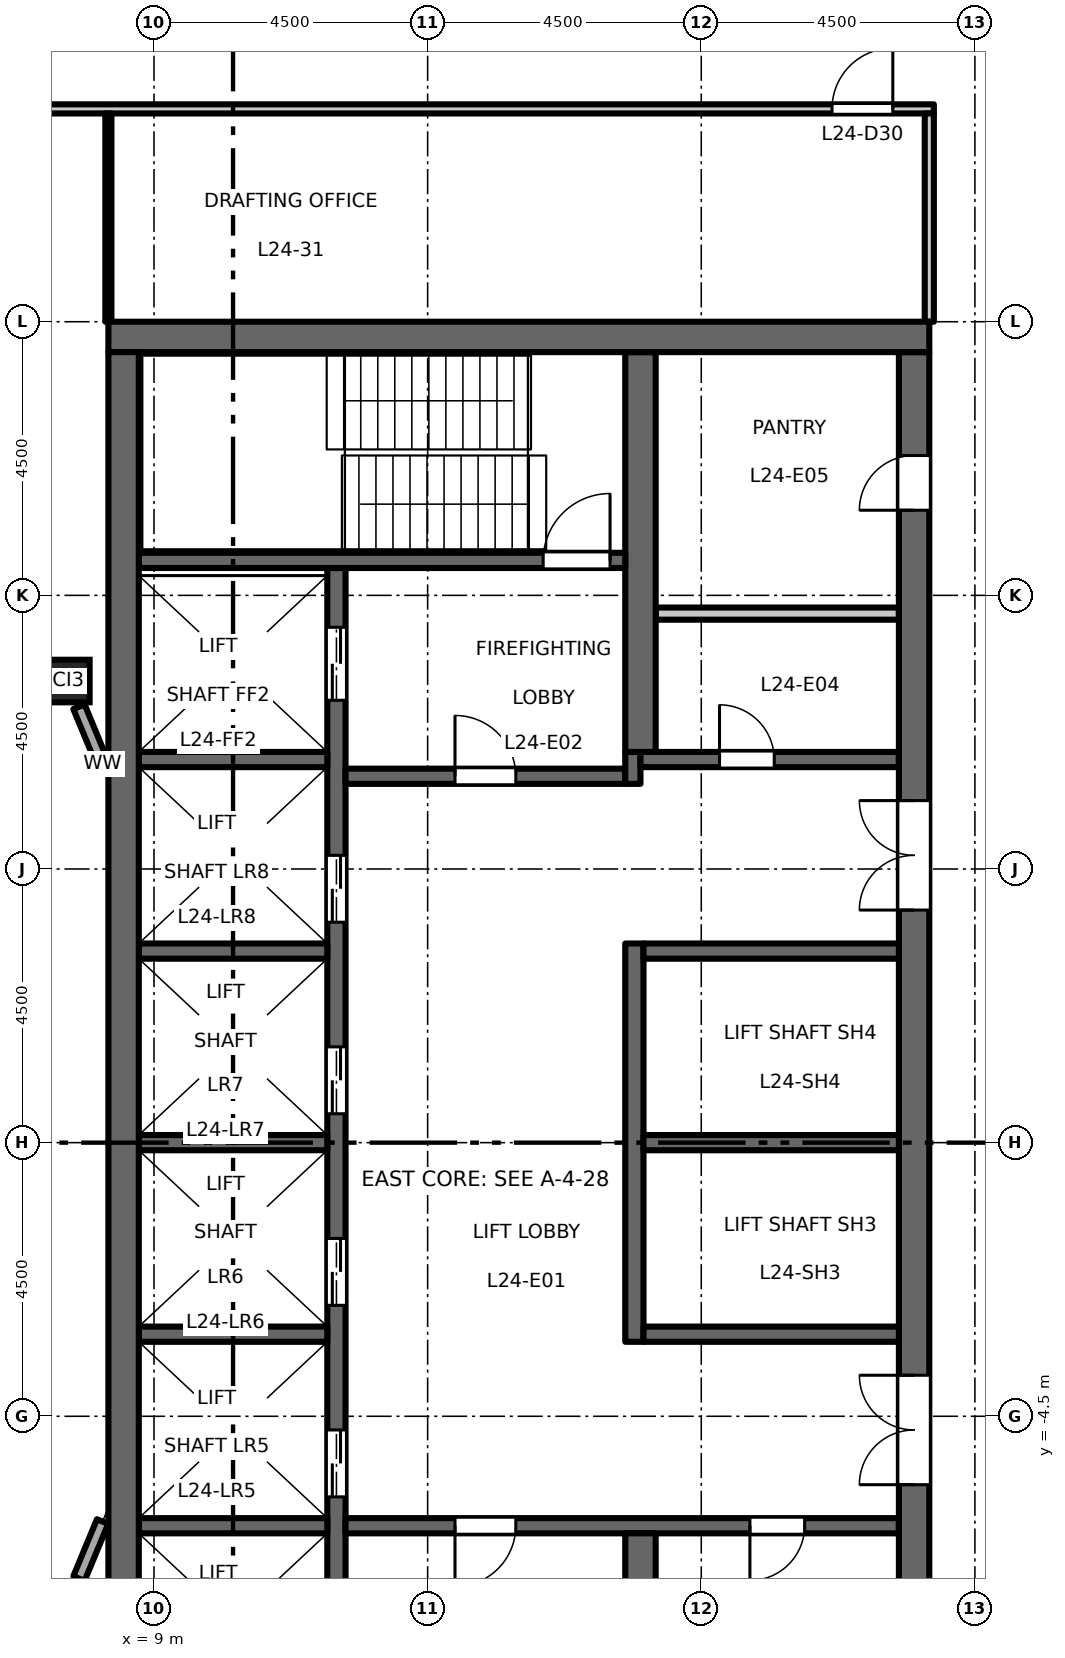
"""IFC4 building model, lengths in metres.
Left out: names, types, materials, properties, quantities, classifications, styles, units other than length and angle.
Written with IfcOpenShell. Run it as: python <this file> out.ifc"""

import sys

from ifc_helpers import new_model, si_unit, direction, frame, frame_2d, origin, origin_2d, place, context, subcontext, project, spatial, rectangle, hollow_rectangle, extrude, element, fill, save


model = new_model("IFC4")
c1 = context("Model", 3, precision=1e-05, world=origin(), true_north=direction((0.0, 1.0)))
c2 = subcontext(c1, "Body", "Model", "MODEL_VIEW")
j1 = project(units=[si_unit("LENGTHUNIT", "METRE"), si_unit("PLANEANGLEUNIT", "RADIAN")], contexts=[c1])
p1 = place(None, origin())
s1 = spatial("IfcSite", under=j1, at=p1, CompositionType="ELEMENT")
p2 = place(p1, origin())
s2 = spatial("IfcBuilding", under=s1, at=p2, CompositionType="ELEMENT")
p3 = place(p2, frame((0.0, 0.0, 113.7)))
s3 = spatial("IfcBuildingStorey", under=s2, at=p3, CompositionType="ELEMENT", Elevation=113.7)
p4 = place(p3, frame((7.591, 7.591, 0.0), z_axis=(0.0, 0.0, 1.0), x_axis=(1.0, 0.0, 0.0)))
e1 = element("IfcColumn", 1, at=p4, inside=s3, PredefinedType="COLUMN", context=c2, shape_type="SweptSolid", body=[
    extrude(hollow_rectangle(XDim=0.7, YDim=0.7, WallThickness=0.04, at=origin_2d()), origin(), (0.0, 0.0, 1.0), 4.5),
])
p5 = place(p3, frame((12.0, -9.45, 0.0), z_axis=(0.0, 0.0, 1.0), x_axis=(0.0, 1.0, 0.0)))
e2 = element("IfcWall", 2, at=p5, inside=s3, PredefinedType="SHEAR", context=c2, shape_type="SweptSolid", body=[
    extrude(rectangle(XDim=18.9, YDim=0.3, at=frame_2d((9.45, 0.0))), origin(), (0.0, 0.0, 1.0), 4.35),
])
p6 = place(p5, frame((3.625, 0.0, 0.0)))
e3 = element("IfcOpeningElement", 3, at=p6, cuts=e2, PredefinedType="OPENING", context=c2, shape_type="SweptSolid", body=[
    extrude(rectangle(XDim=1.1, YDim=2.1, at=frame_2d((0.55, 1.05))), frame((0.0, 0.16, 0.0), z_axis=(0.0, -1.0, 0.0), x_axis=(1.0, 0.0, 0.0)), (0.0, 0.0, 1.0), 0.32),
])
p7 = place(p5, frame((6.775, 0.0, 0.0)))
e4 = element("IfcOpeningElement", 4, at=p7, cuts=e2, PredefinedType="OPENING", context=c2, shape_type="SweptSolid", body=[
    extrude(rectangle(XDim=1.1, YDim=2.1, at=frame_2d((0.55, 1.05))), frame((0.0, 0.16, 0.0), z_axis=(0.0, -1.0, 0.0), x_axis=(1.0, 0.0, 0.0)), (0.0, 0.0, 1.0), 0.32),
])
p8 = place(p5, frame((9.925, 0.0, 0.0)))
e5 = element("IfcOpeningElement", 5, at=p8, cuts=e2, PredefinedType="OPENING", context=c2, shape_type="SweptSolid", body=[
    extrude(rectangle(XDim=1.1, YDim=2.1, at=frame_2d((0.55, 1.05))), frame((0.0, 0.16, 0.0), z_axis=(0.0, -1.0, 0.0), x_axis=(1.0, 0.0, 0.0)), (0.0, 0.0, 1.0), 0.32),
])
p9 = place(p5, frame((13.075, 0.0, 0.0)))
e6 = element("IfcOpeningElement", 6, at=p9, cuts=e2, PredefinedType="OPENING", context=c2, shape_type="SweptSolid", body=[
    extrude(rectangle(XDim=1.1, YDim=2.1, at=frame_2d((0.55, 1.05))), frame((0.0, 0.16, 0.0), z_axis=(0.0, -1.0, 0.0), x_axis=(1.0, 0.0, 0.0)), (0.0, 0.0, 1.0), 0.32),
])
p10 = place(p5, frame((16.725, 0.0, 0.0)))
e7 = element("IfcOpeningElement", 7, at=p10, cuts=e2, PredefinedType="OPENING", context=c2, shape_type="SweptSolid", body=[
    extrude(rectangle(XDim=1.2, YDim=2.1, at=frame_2d((0.6, 1.05))), frame((0.0, 0.16, 0.0), z_axis=(0.0, -1.0, 0.0), x_axis=(1.0, 0.0, 0.0)), (0.0, 0.0, 1.0), 0.32),
])
p11 = place(p5, frame((0.975, 0.0, 0.0)))
e8 = element("IfcOpeningElement", 8, at=p11, cuts=e2, PredefinedType="OPENING", context=c2, shape_type="SweptSolid", body=[
    extrude(rectangle(XDim=1.2, YDim=2.1, at=frame_2d((0.6, 1.05))), frame((0.0, 0.16, 0.0), z_axis=(0.0, -1.0, 0.0), x_axis=(1.0, 0.0, 0.0)), (0.0, 0.0, 1.0), 0.32),
])
p12 = place(p3, frame((12.15, 6.025, 0.0), z_axis=(0.0, 0.0, 1.0), x_axis=(1.0, 0.0, 0.0)))
e9 = element("IfcWall", 9, at=p12, inside=s3, PredefinedType="SHEAR", context=c2, shape_type="SweptSolid", body=[
    extrude(rectangle(XDim=4.6, YDim=0.25, at=frame_2d((2.3, 0.0))), origin(), (0.0, 0.0, 1.0), 4.35),
])
p13 = place(p12, frame((1.8, 0.0, 0.0)))
e10 = element("IfcOpeningElement", 10, at=p13, cuts=e9, PredefinedType="OPENING", context=c2, shape_type="SweptSolid", body=[
    extrude(rectangle(XDim=1.0, YDim=2.1, at=frame_2d((0.5, 1.05))), frame((0.0, 0.135, 0.0), z_axis=(0.0, -1.0, 0.0), x_axis=(1.0, 0.0, 0.0)), (0.0, 0.0, 1.0), 0.27),
])
p14 = place(p3, frame((16.875, 5.9, 0.0), z_axis=(0.0, 0.0, 1.0), x_axis=(0.0, 1.0, 0.0)))
e11 = element("IfcWall", 11, at=p14, inside=s3, PredefinedType="SHEAR", context=c2, shape_type="SweptSolid", body=[
    extrude(rectangle(XDim=0.525, YDim=0.25, at=frame_2d((0.263, 0.0))), origin(), (0.0, 0.0, 1.0), 4.35),
])
p15 = place(p3, frame((17.0, 6.3, 0.0), z_axis=(0.0, 0.0, 1.0), x_axis=(1.0, 0.0, 0.0)))
e12 = element("IfcWall", 12, at=p15, inside=s3, PredefinedType="SHEAR", context=c2, shape_type="SweptSolid", body=[
    extrude(rectangle(XDim=4.25, YDim=0.25, at=frame_2d((2.125, 0.0))), origin(), (0.0, 0.0, 1.0), 4.35),
])
p16 = place(p15, frame((1.3, 0.0, 0.0)))
e13 = element("IfcOpeningElement", 13, at=p16, cuts=e12, PredefinedType="OPENING", context=c2, shape_type="SweptSolid", body=[
    extrude(rectangle(XDim=0.9, YDim=2.1, at=frame_2d((0.45, 1.05))), frame((0.0, 0.135, 0.0), z_axis=(0.0, -1.0, 0.0), x_axis=(1.0, 0.0, 0.0)), (0.0, 0.0, 1.0), 0.27),
])
p17 = place(p3, frame((12.15, -6.3, 0.0), z_axis=(0.0, 0.0, 1.0), x_axis=(1.0, 0.0, 0.0)))
e14 = element("IfcWall", 14, at=p17, inside=s3, PredefinedType="SHEAR", context=c2, shape_type="SweptSolid", body=[
    extrude(rectangle(XDim=9.1, YDim=0.25, at=frame_2d((4.55, 0.0))), origin(), (0.0, 0.0, 1.0), 4.35),
])
p18 = place(p17, frame((1.8, 0.0, 0.0)))
e15 = element("IfcOpeningElement", 15, at=p18, cuts=e14, PredefinedType="OPENING", context=c2, shape_type="SweptSolid", body=[
    extrude(rectangle(XDim=1.0, YDim=2.1, at=frame_2d((0.5, 1.05))), frame((0.0, 0.135, 0.0), z_axis=(0.0, -1.0, 0.0), x_axis=(1.0, 0.0, 0.0)), (0.0, 0.0, 1.0), 0.27),
])
p19 = place(p17, frame((6.65, 0.0, 0.0)))
e16 = element("IfcOpeningElement", 16, at=p19, cuts=e14, PredefinedType="OPENING", context=c2, shape_type="SweptSolid", body=[
    extrude(rectangle(XDim=0.9, YDim=2.1, at=frame_2d((0.45, 1.05))), frame((0.0, 0.135, 0.0), z_axis=(0.0, -1.0, 0.0), x_axis=(1.0, 0.0, 0.0)), (0.0, 0.0, 1.0), 0.27),
])
p20 = place(p3, frame((21.5, -13.0, 0.0), z_axis=(0.0, 0.0, 1.0), x_axis=(0.0, 1.0, 0.0)))
e17 = element("IfcWall", 17, at=p20, inside=s3, PredefinedType="SHEAR", context=c2, shape_type="SweptSolid", body=[
    extrude(rectangle(XDim=26.0, YDim=0.5, at=frame_2d((13.0, 0.0))), origin(), (0.0, 0.0, 1.0), 4.35),
])
p21 = place(p20, frame((16.825, 0.0, 0.0)))
e18 = element("IfcOpeningElement", 18, at=p21, cuts=e17, PredefinedType="OPENING", context=c2, shape_type="SweptSolid", body=[
    extrude(rectangle(XDim=1.8, YDim=2.1, at=frame_2d((0.9, 1.05))), frame((0.0, 0.26, 0.0), z_axis=(0.0, -1.0, 0.0), x_axis=(1.0, 0.0, 0.0)), (0.0, 0.0, 1.0), 0.52),
])
p22 = place(p20, frame((7.375, 0.0, 0.0)))
e19 = element("IfcOpeningElement", 19, at=p22, cuts=e17, PredefinedType="OPENING", context=c2, shape_type="SweptSolid", body=[
    extrude(rectangle(XDim=1.8, YDim=2.1, at=frame_2d((0.9, 1.05))), frame((0.0, 0.26, 0.0), z_axis=(0.0, -1.0, 0.0), x_axis=(1.0, 0.0, 0.0)), (0.0, 0.0, 1.0), 0.52),
])
p23 = place(p20, frame((23.4, 0.0, 0.0)))
e20 = element("IfcOpeningElement", 20, at=p23, cuts=e17, PredefinedType="OPENING", context=c2, shape_type="SweptSolid", body=[
    extrude(rectangle(XDim=0.9, YDim=2.1, at=frame_2d((0.45, 1.05))), frame((0.0, 0.26, 0.0), z_axis=(0.0, -1.0, 0.0), x_axis=(1.0, 0.0, 0.0)), (0.0, 0.0, 1.0), 0.52),
])
p24 = place(p3, frame((17.25, 8.7, 0.0), z_axis=(0.0, 0.0, 1.0), x_axis=(1.0, 0.0, 0.0)))
e21 = element("IfcWall", 21, at=p24, inside=s3, PredefinedType="PARTITIONING", context=c2, shape_type="SweptSolid", body=[
    extrude(rectangle(XDim=4.0, YDim=0.2, at=frame_2d((2.0, 0.0))), origin(), (0.0, 0.0, 1.0), 4.35),
])
p25 = place(p3, frame((16.9, -3.275, 0.0), z_axis=(0.0, 0.0, 1.0), x_axis=(0.0, 1.0, 0.0)))
e22 = element("IfcWall", 22, at=p25, inside=s3, PredefinedType="SHEAR", context=c2, shape_type="SweptSolid", body=[
    extrude(rectangle(XDim=6.55, YDim=0.3, at=frame_2d((3.275, 0.0))), origin(), (0.0, 0.0, 1.0), 4.35),
])
for number, where, z_axis, x_axis in (
    (23, (17.05, 0.0, 0.0), (0.0, 0.0, 1.0), (1.0, 0.0, 0.0)),
    (24, (17.05, 3.15, 0.0), (0.0, 0.0, 1.0), (1.0, 0.0, 0.0)),
    (25, (17.05, -3.15, 0.0), (0.0, 0.0, 1.0), (1.0, 0.0, 0.0)),
):
    element("IfcWall", number, at=place(p3, frame(where, z_axis=z_axis, x_axis=x_axis)), inside=s3, PredefinedType="SHEAR", context=c2, shape_type="SweptSolid", body=[
        extrude(rectangle(XDim=4.2, YDim=0.25, at=frame_2d((2.1, 0.0))), origin(), (0.0, 0.0, 1.0), 4.35),
    ])
for number, where, z_axis, x_axis in (
    (26, (17.0, 6.425, 0.0), (0.0, 0.0, 1.0), (0.0, 1.0, 0.0)),
    (27, (17.0, -13.0, 0.0), (0.0, 0.0, 1.0), (0.0, 1.0, 0.0)),
):
    element("IfcWall", number, at=place(p3, frame(where, z_axis=z_axis, x_axis=x_axis)), inside=s3, PredefinedType="SHEAR", context=c2, shape_type="SweptSolid", body=[
        extrude(rectangle(XDim=6.575, YDim=0.5, at=frame_2d((3.288, 0.0))), origin(), (0.0, 0.0, 1.0), 4.35),
    ])
for number, where, z_axis, x_axis in (
    (28, (8.75, 0.0, 0.0), (0.0, 0.0, 1.0), (1.0, 0.0, 0.0)),
    (29, (8.75, 3.15, 0.0), (0.0, 0.0, 1.0), (1.0, 0.0, 0.0)),
    (30, (8.75, 6.3, 0.0), (0.0, 0.0, 1.0), (1.0, 0.0, 0.0)),
    (31, (8.75, -3.15, 0.0), (0.0, 0.0, 1.0), (1.0, 0.0, 0.0)),
    (32, (8.75, -6.3, 0.0), (0.0, 0.0, 1.0), (1.0, 0.0, 0.0)),
):
    element("IfcWall", number, at=place(p3, frame(where, z_axis=z_axis, x_axis=x_axis)), inside=s3, PredefinedType="SHEAR", context=c2, shape_type="SweptSolid", body=[
        extrude(rectangle(XDim=3.1, YDim=0.25, at=frame_2d((1.55, 0.0))), origin(), (0.0, 0.0, 1.0), 4.35),
    ])
p26 = place(p3, frame((8.75, 9.575, 0.0), z_axis=(0.0, 0.0, 1.0), x_axis=(1.0, 0.0, 0.0)))
e33 = element("IfcWall", 33, at=p26, inside=s3, PredefinedType="SHEAR", context=c2, shape_type="SweptSolid", body=[
    extrude(rectangle(XDim=8.0, YDim=0.25, at=frame_2d((4.0, 0.0))), origin(), (0.0, 0.0, 1.0), 4.35),
])
p27 = place(p26, frame((6.65, 0.0, 0.0)))
e34 = element("IfcOpeningElement", 34, at=p27, cuts=e33, PredefinedType="OPENING", context=c2, shape_type="SweptSolid", body=[
    extrude(rectangle(XDim=1.1, YDim=2.1, at=frame_2d((0.55, 1.05))), frame((0.0, 0.135, 0.0), z_axis=(0.0, -1.0, 0.0), x_axis=(1.0, 0.0, 0.0)), (0.0, 0.0, 1.0), 0.27),
])
p28 = place(p3, frame((8.25, 13.25, 0.0), z_axis=(0.0, 0.0, 1.0), x_axis=(1.0, 0.0, 0.0)))
e35 = element("IfcWall", 35, at=p28, inside=s3, PredefinedType="SHEAR", context=c2, shape_type="SweptSolid", body=[
    extrude(rectangle(XDim=13.5, YDim=0.5, at=frame_2d((6.75, 0.0))), origin(), (0.0, 0.0, 1.0), 4.35),
])
p29 = place(p3, frame((8.5, -13.0, 0.0), z_axis=(0.0, 0.0, 1.0), x_axis=(0.0, 1.0, 0.0)))
e36 = element("IfcWall", 36, at=p29, inside=s3, PredefinedType="SHEAR", context=c2, shape_type="SweptSolid", body=[
    extrude(rectangle(XDim=26.0, YDim=0.5, at=frame_2d((13.0, 0.0))), origin(), (0.0, 0.0, 1.0), 4.35),
])
for number, where, z_axis, x_axis in (
    (37, (7.766, -7.168, 0.0), (0.0, 0.0, 1.0), (0.383, 0.924, 0.0)),
    (38, (8.154, 6.231, 0.0), (0.0, 0.0, 1.0), (-0.383, 0.924, 0.0)),
):
    element("IfcWall", number, at=place(p3, frame(where, z_axis=z_axis, x_axis=x_axis)), inside=s3, PredefinedType="STANDARD", context=c2, shape_type="SweptSolid", body=[
        extrude(rectangle(XDim=1.015, YDim=0.2, at=frame_2d((0.507, 0.0))), origin(), (0.0, 0.0, 1.0), 3.826),
    ])
p30 = place(p3, frame((-21.825, 17.0, 0.0), z_axis=(0.0, 0.0, 1.0), x_axis=(1.0, 0.0, 0.0)))
e39 = element("IfcWall", 39, at=p30, inside=s3, PredefinedType="PARTITIONING", context=c2, shape_type="SweptSolid", body=[
    extrude(rectangle(XDim=43.65, YDim=0.15, at=frame_2d((21.825, 0.0))), origin(), (0.0, 0.0, 1.0), 4.35),
])
p31 = place(p30, frame((20.225, 0.0, 0.0)))
e40 = element("IfcOpeningElement", 40, at=p31, cuts=e39, PredefinedType="OPENING", context=c2, shape_type="SweptSolid", body=[
    extrude(rectangle(XDim=1.0, YDim=2.1, at=frame_2d((0.5, 1.05))), frame((0.0, 0.085, 0.0), z_axis=(0.0, -1.0, 0.0), x_axis=(1.0, 0.0, 0.0)), (0.0, 0.0, 1.0), 0.17),
])
p32 = place(p30, frame((22.475, 0.0, 0.0)))
e41 = element("IfcOpeningElement", 41, at=p32, cuts=e39, PredefinedType="OPENING", context=c2, shape_type="SweptSolid", body=[
    extrude(rectangle(XDim=1.0, YDim=2.1, at=frame_2d((0.5, 1.05))), frame((0.0, 0.085, 0.0), z_axis=(0.0, -1.0, 0.0), x_axis=(1.0, 0.0, 0.0)), (0.0, 0.0, 1.0), 0.17),
])
p33 = place(p30, frame((0.725, 0.0, 0.0)))
e42 = element("IfcOpeningElement", 42, at=p33, cuts=e39, PredefinedType="OPENING", context=c2, shape_type="SweptSolid", body=[
    extrude(rectangle(XDim=1.0, YDim=2.1, at=frame_2d((0.5, 1.05))), frame((0.0, 0.085, 0.0), z_axis=(0.0, -1.0, 0.0), x_axis=(1.0, 0.0, 0.0)), (0.0, 0.0, 1.0), 0.17),
])
p34 = place(p30, frame((41.975, 0.0, 0.0)))
e43 = element("IfcOpeningElement", 43, at=p34, cuts=e39, PredefinedType="OPENING", context=c2, shape_type="SweptSolid", body=[
    extrude(rectangle(XDim=1.0, YDim=2.1, at=frame_2d((0.5, 1.05))), frame((0.0, 0.085, 0.0), z_axis=(0.0, -1.0, 0.0), x_axis=(1.0, 0.0, 0.0)), (0.0, 0.0, 1.0), 0.17),
])
p35 = place(p3, frame((8.25, 13.5, 0.0), z_axis=(0.0, 0.0, 1.0), x_axis=(0.0, 1.0, 0.0)))
e44 = element("IfcWall", 44, at=p35, inside=s3, PredefinedType="PARTITIONING", context=c2, shape_type="SweptSolid", body=[
    extrude(rectangle(XDim=3.425, YDim=0.1, at=frame_2d((1.712, 0.0))), origin(), (0.0, 0.0, 1.0), 4.35),
])
p36 = place(p3, frame((21.75, 13.5, 0.0), z_axis=(0.0, 0.0, 1.0), x_axis=(0.0, 1.0, 0.0)))
e45 = element("IfcWall", 45, at=p36, inside=s3, PredefinedType="PARTITIONING", context=c2, shape_type="SweptSolid", body=[
    extrude(rectangle(XDim=3.425, YDim=0.15, at=frame_2d((1.712, 0.0))), origin(), (0.0, 0.0, 1.0), 4.35),
])
p37 = place(p13, origin())
e46 = element("IfcDoor", 46, at=p37, inside=s3, OperationType="SINGLE_SWING_RIGHT", PredefinedType="DOOR", context=c2, shape_type="SweptSolid", body=[
    extrude(rectangle(XDim=1.0, YDim=2.1, at=frame_2d((0.5, 1.05))), frame((0.0, 0.025, 0.0), z_axis=(0.0, -1.0, 0.0), x_axis=(1.0, 0.0, 0.0)), (0.0, 0.0, 1.0), 0.05),
])
fill(e10, e46)
p38 = place(p18, origin())
e47 = element("IfcDoor", 47, at=p38, inside=s3, OperationType="SINGLE_SWING_LEFT", PredefinedType="DOOR", context=c2, shape_type="SweptSolid", body=[
    extrude(rectangle(XDim=1.0, YDim=2.1, at=frame_2d((0.5, 1.05))), frame((0.0, 0.025, 0.0), z_axis=(0.0, -1.0, 0.0), x_axis=(1.0, 0.0, 0.0)), (0.0, 0.0, 1.0), 0.05),
])
fill(e15, e47)
p39 = place(p27, origin())
e48 = element("IfcDoor", 48, at=p39, inside=s3, OperationType="SINGLE_SWING_LEFT", PredefinedType="DOOR", context=c2, shape_type="SweptSolid", body=[
    extrude(rectangle(XDim=1.1, YDim=2.1, at=frame_2d((0.55, 1.05))), frame((0.0, 0.025, 0.0), z_axis=(0.0, -1.0, 0.0), x_axis=(1.0, 0.0, 0.0)), (0.0, 0.0, 1.0), 0.05),
])
fill(e34, e48)
p40 = place(p21, origin())
e49 = element("IfcDoor", 49, at=p40, inside=s3, OperationType="DOUBLE_DOOR_DOUBLE_SWING", PredefinedType="DOOR", context=c2, shape_type="SweptSolid", body=[
    extrude(rectangle(XDim=1.8, YDim=2.1, at=frame_2d((0.9, 1.05))), frame((0.0, 0.025, 0.0), z_axis=(0.0, -1.0, 0.0), x_axis=(1.0, 0.0, 0.0)), (0.0, 0.0, 1.0), 0.05),
])
fill(e18, e49)
p41 = place(p22, origin())
e50 = element("IfcDoor", 50, at=p41, inside=s3, OperationType="DOUBLE_DOOR_DOUBLE_SWING", PredefinedType="DOOR", context=c2, shape_type="SweptSolid", body=[
    extrude(rectangle(XDim=1.8, YDim=2.1, at=frame_2d((0.9, 1.05))), frame((0.0, 0.025, 0.0), z_axis=(0.0, -1.0, 0.0), x_axis=(1.0, 0.0, 0.0)), (0.0, 0.0, 1.0), 0.05),
])
fill(e19, e50)
p42 = place(p6, origin())
e51 = element("IfcDoor", 51, at=p42, inside=s3, OperationType="DOUBLE_DOOR_SLIDING", PredefinedType="DOOR", context=c2, shape_type="SweptSolid", body=[
    extrude(rectangle(XDim=1.1, YDim=2.1, at=frame_2d((0.55, 1.05))), frame((0.0, 0.025, 0.0), z_axis=(0.0, -1.0, 0.0), x_axis=(1.0, 0.0, 0.0)), (0.0, 0.0, 1.0), 0.05),
])
fill(e3, e51)
p43 = place(p7, origin())
e52 = element("IfcDoor", 52, at=p43, inside=s3, OperationType="DOUBLE_DOOR_SLIDING", PredefinedType="DOOR", context=c2, shape_type="SweptSolid", body=[
    extrude(rectangle(XDim=1.1, YDim=2.1, at=frame_2d((0.55, 1.05))), frame((0.0, 0.025, 0.0), z_axis=(0.0, -1.0, 0.0), x_axis=(1.0, 0.0, 0.0)), (0.0, 0.0, 1.0), 0.05),
])
fill(e4, e52)
p44 = place(p8, origin())
e53 = element("IfcDoor", 53, at=p44, inside=s3, OperationType="DOUBLE_DOOR_SLIDING", PredefinedType="DOOR", context=c2, shape_type="SweptSolid", body=[
    extrude(rectangle(XDim=1.1, YDim=2.1, at=frame_2d((0.55, 1.05))), frame((0.0, 0.025, 0.0), z_axis=(0.0, -1.0, 0.0), x_axis=(1.0, 0.0, 0.0)), (0.0, 0.0, 1.0), 0.05),
])
fill(e5, e53)
p45 = place(p9, origin())
e54 = element("IfcDoor", 54, at=p45, inside=s3, OperationType="DOUBLE_DOOR_SLIDING", PredefinedType="DOOR", context=c2, shape_type="SweptSolid", body=[
    extrude(rectangle(XDim=1.1, YDim=2.1, at=frame_2d((0.55, 1.05))), frame((0.0, 0.025, 0.0), z_axis=(0.0, -1.0, 0.0), x_axis=(1.0, 0.0, 0.0)), (0.0, 0.0, 1.0), 0.05),
])
fill(e6, e54)
p46 = place(p10, origin())
e55 = element("IfcDoor", 55, at=p46, inside=s3, OperationType="DOUBLE_DOOR_SLIDING", PredefinedType="DOOR", context=c2, shape_type="SweptSolid", body=[
    extrude(rectangle(XDim=1.2, YDim=2.1, at=frame_2d((0.6, 1.05))), frame((0.0, 0.025, 0.0), z_axis=(0.0, -1.0, 0.0), x_axis=(1.0, 0.0, 0.0)), (0.0, 0.0, 1.0), 0.05),
])
fill(e7, e55)
p47 = place(p16, origin())
e56 = element("IfcDoor", 56, at=p47, inside=s3, OperationType="SINGLE_SWING_RIGHT", PredefinedType="DOOR", context=c2, shape_type="SweptSolid", body=[
    extrude(rectangle(XDim=0.9, YDim=2.1, at=frame_2d((0.45, 1.05))), frame((0.0, 0.025, 0.0), z_axis=(0.0, -1.0, 0.0), x_axis=(1.0, 0.0, 0.0)), (0.0, 0.0, 1.0), 0.05),
])
fill(e13, e56)
p48 = place(p23, origin())
e57 = element("IfcDoor", 57, at=p48, inside=s3, OperationType="SINGLE_SWING_RIGHT", PredefinedType="DOOR", context=c2, shape_type="SweptSolid", body=[
    extrude(rectangle(XDim=0.9, YDim=2.1, at=frame_2d((0.45, 1.05))), frame((0.0, 0.025, 0.0), z_axis=(0.0, -1.0, 0.0), x_axis=(1.0, 0.0, 0.0)), (0.0, 0.0, 1.0), 0.05),
])
fill(e20, e57)
p49 = place(p19, origin())
e58 = element("IfcDoor", 58, at=p49, inside=s3, OperationType="SINGLE_SWING_LEFT", PredefinedType="DOOR", context=c2, shape_type="SweptSolid", body=[
    extrude(rectangle(XDim=0.9, YDim=2.1, at=frame_2d((0.45, 1.05))), frame((0.0, 0.025, 0.0), z_axis=(0.0, -1.0, 0.0), x_axis=(1.0, 0.0, 0.0)), (0.0, 0.0, 1.0), 0.05),
])
fill(e16, e58)
p50 = place(p34, origin())
e59 = element("IfcDoor", 59, at=p50, inside=s3, OperationType="SINGLE_SWING_RIGHT", PredefinedType="DOOR", context=c2, shape_type="SweptSolid", body=[
    extrude(rectangle(XDim=1.0, YDim=2.1, at=frame_2d((0.5, 1.05))), frame((0.0, 0.025, 0.0), z_axis=(0.0, -1.0, 0.0), x_axis=(1.0, 0.0, 0.0)), (0.0, 0.0, 1.0), 0.05),
])
fill(e43, e59)
save(model, sys.argv[1])
